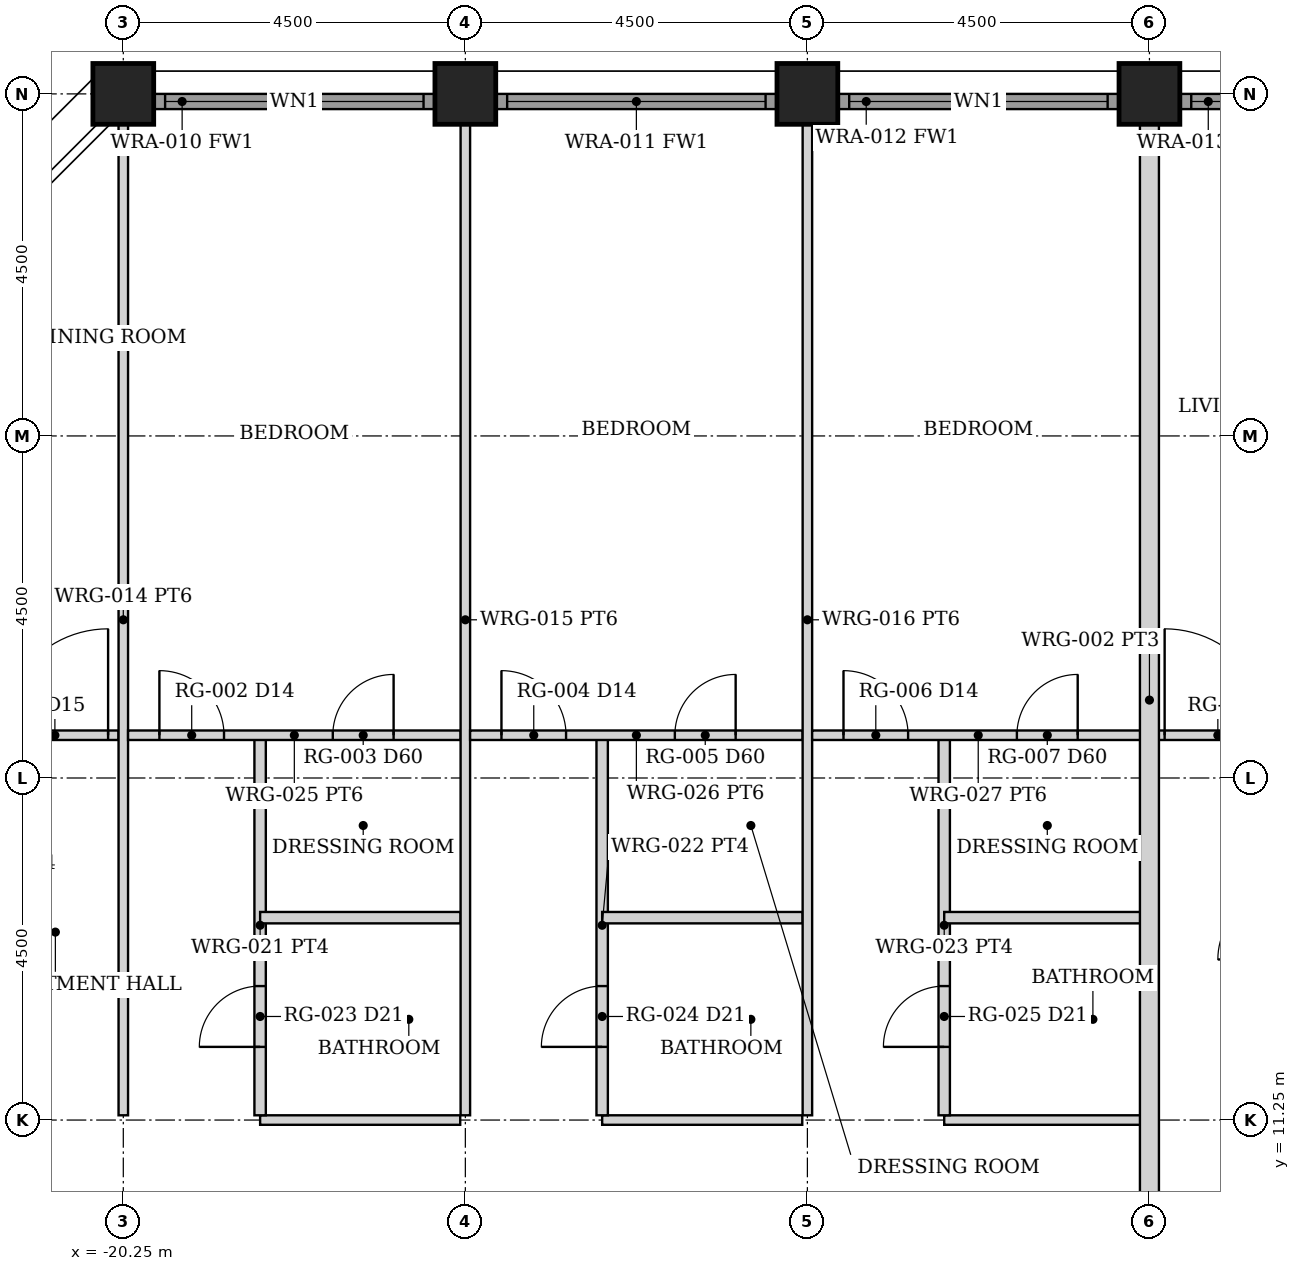
"""IFC4 building model, lengths in metres.
Left out: names, types, materials, properties, quantities, classifications, styles, units other than length and angle.
Written with IfcOpenShell. Run it as: python <this file> out.ifc"""

import sys

from ifc_helpers import new_model, si_unit, direction, frame, frame_2d, origin, origin_2d, place, context, subcontext, project, spatial, rectangle, hollow_rectangle, extrude, element, fill, save


model = new_model("IFC4")
c1 = context("Model", 3, precision=1e-05, world=origin(), true_north=direction((0.0, 1.0)))
c2 = subcontext(c1, "Body", "Model", "MODEL_VIEW")
j1 = project(units=[si_unit("LENGTHUNIT", "METRE"), si_unit("PLANEANGLEUNIT", "RADIAN")], contexts=[c1])
p1 = place(None, origin())
s1 = spatial("IfcSite", under=j1, at=p1, CompositionType="ELEMENT")
p2 = place(p1, origin())
s2 = spatial("IfcBuilding", under=s1, at=p2, CompositionType="ELEMENT")
p3 = place(p2, frame((0.0, 0.0, 89.5)))
s3 = spatial("IfcBuildingStorey", under=s2, at=p3, CompositionType="ELEMENT", Elevation=89.5)
for number, where, z_axis, x_axis in (
    (1, (-20.25, 24.75, 0.0), (0.0, 0.0, 1.0), (0.0, 1.0, 0.0)),
    (2, (-15.75, 24.75, 0.0), (0.0, 0.0, 1.0), (0.0, 1.0, 0.0)),
    (3, (-11.25, 24.75, 0.0), (0.0, 0.0, 1.0), (0.0, 1.0, 0.0)),
    (4, (-6.75, 24.75, 0.0), (0.0, 0.0, 1.0), (0.0, 1.0, 0.0)),
):
    element("IfcColumn", number, at=place(p3, frame(where, z_axis=z_axis, x_axis=x_axis)), inside=s3, PredefinedType="COLUMN", context=c2, shape_type="SweptSolid", body=[
        extrude(hollow_rectangle(XDim=0.8, YDim=0.8, WallThickness=0.06, at=origin_2d()), origin(), (0.0, 0.0, 1.0), 3.5),
    ])
p4 = place(p3, frame((-19.845, 24.65, 0.0), z_axis=(0.0, 0.0, 1.0), x_axis=(1.0, 0.0, 0.0)))
e5 = element("IfcWall", 5, at=p4, inside=s3, PredefinedType="SOLIDWALL", context=c2, shape_type="SweptSolid", body=[
    extrude(rectangle(XDim=3.69, YDim=0.2, at=frame_2d((1.845, 0.0))), origin(), (0.0, 0.0, 1.0), 2.379),
])
p5 = place(p4, frame((0.145, 0.0, 0.3)))
e6 = element("IfcOpeningElement", 6, at=p5, cuts=e5, PredefinedType="OPENING", context=c2, shape_type="SweptSolid", body=[
    extrude(rectangle(XDim=3.4, YDim=1.929, at=frame_2d((1.7, 0.964))), frame((0.0, 0.11, 0.0), z_axis=(0.0, -1.0, 0.0), x_axis=(1.0, 0.0, 0.0)), (0.0, 0.0, 1.0), 0.22),
])
p6 = place(p3, frame((-15.345, 24.65, 0.0), z_axis=(0.0, 0.0, 1.0), x_axis=(1.0, 0.0, 0.0)))
e7 = element("IfcWall", 7, at=p6, inside=s3, PredefinedType="SOLIDWALL", context=c2, shape_type="SweptSolid", body=[
    extrude(rectangle(XDim=3.69, YDim=0.2, at=frame_2d((1.845, 0.0))), origin(), (0.0, 0.0, 1.0), 2.379),
])
p7 = place(p6, frame((0.145, 0.0, 0.3)))
e8 = element("IfcOpeningElement", 8, at=p7, cuts=e7, PredefinedType="OPENING", context=c2, shape_type="SweptSolid", body=[
    extrude(rectangle(XDim=3.4, YDim=1.929, at=frame_2d((1.7, 0.964))), frame((0.0, 0.11, 0.0), z_axis=(0.0, -1.0, 0.0), x_axis=(1.0, 0.0, 0.0)), (0.0, 0.0, 1.0), 0.22),
])
p8 = place(p3, frame((-10.845, 24.65, 0.0), z_axis=(0.0, 0.0, 1.0), x_axis=(1.0, 0.0, 0.0)))
e9 = element("IfcWall", 9, at=p8, inside=s3, PredefinedType="SOLIDWALL", context=c2, shape_type="SweptSolid", body=[
    extrude(rectangle(XDim=3.69, YDim=0.2, at=frame_2d((1.845, 0.0))), origin(), (0.0, 0.0, 1.0), 2.379),
])
p9 = place(p8, frame((0.145, 0.0, 0.3)))
e10 = element("IfcOpeningElement", 10, at=p9, cuts=e9, PredefinedType="OPENING", context=c2, shape_type="SweptSolid", body=[
    extrude(rectangle(XDim=3.4, YDim=1.929, at=frame_2d((1.7, 0.964))), frame((0.0, 0.11, 0.0), z_axis=(0.0, -1.0, 0.0), x_axis=(1.0, 0.0, 0.0)), (0.0, 0.0, 1.0), 0.22),
])
p10 = place(p3, frame((-6.345, 24.65, 0.0), z_axis=(0.0, 0.0, 1.0), x_axis=(1.0, 0.0, 0.0)))
e11 = element("IfcWall", 11, at=p10, inside=s3, PredefinedType="SOLIDWALL", context=c2, shape_type="SweptSolid", body=[
    extrude(rectangle(XDim=3.69, YDim=0.2, at=frame_2d((1.845, 0.0))), origin(), (0.0, 0.0, 1.0), 2.379),
])
p11 = place(p10, frame((0.145, 0.0, 0.3)))
e12 = element("IfcOpeningElement", 12, at=p11, cuts=e11, PredefinedType="OPENING", context=c2, shape_type="SweptSolid", body=[
    extrude(rectangle(XDim=3.4, YDim=1.929, at=frame_2d((1.7, 0.964))), frame((0.0, 0.11, 0.0), z_axis=(0.0, -1.0, 0.0), x_axis=(1.0, 0.0, 0.0)), (0.0, 0.0, 1.0), 0.22),
])
p12 = place(p3, frame((-24.55, 16.312, 0.0), z_axis=(0.0, 0.0, 1.0), x_axis=(1.0, 0.0, 0.0)))
e13 = element("IfcWall", 13, at=p12, inside=s3, PredefinedType="PARTITIONING", context=c2, shape_type="SweptSolid", body=[
    extrude(rectangle(XDim=4.238, YDim=0.125, at=frame_2d((2.119, 0.0))), origin(), (0.0, 0.0, 1.0), 2.373),
])
p13 = place(p12, frame((2.7, 0.0, 0.0)))
e14 = element("IfcOpeningElement", 14, at=p13, cuts=e13, PredefinedType="OPENING", context=c2, shape_type="SweptSolid", body=[
    extrude(rectangle(XDim=1.4, YDim=2.1, at=frame_2d((0.7, 1.05))), frame((0.0, 0.073, 0.0), z_axis=(0.0, -1.0, 0.0), x_axis=(1.0, 0.0, 0.0)), (0.0, 0.0, 1.0), 0.145),
])
p14 = place(p3, frame((-20.25, 11.312, 0.0), z_axis=(0.0, 0.0, 1.0), x_axis=(0.0, 1.0, 0.0)))
e15 = element("IfcWall", 15, at=p14, inside=s3, PredefinedType="PARTITIONING", context=c2, shape_type="SweptSolid", body=[
    extrude(rectangle(XDim=13.038, YDim=0.125, at=frame_2d((6.519, 0.0))), origin(), (0.0, 0.0, 1.0), 2.373),
])
p15 = place(p3, frame((-18.45, 11.25, 0.0), z_axis=(0.0, 0.0, 1.0), x_axis=(1.0, 0.0, 0.0)))
e16 = element("IfcWall", 16, at=p15, inside=s3, PredefinedType="PARTITIONING", context=c2, shape_type="SweptSolid", body=[
    extrude(rectangle(XDim=2.633, YDim=0.125, at=frame_2d((1.316, 0.0))), origin(), (0.0, 0.0, 1.0), 2.373),
])
p16 = place(p3, frame((-18.45, 11.312, 0.0), z_axis=(0.0, 0.0, 1.0), x_axis=(0.0, 1.0, 0.0)))
e17 = element("IfcWall", 17, at=p16, inside=s3, PredefinedType="PARTITIONING", context=c2, shape_type="SweptSolid", body=[
    extrude(rectangle(XDim=5.0, YDim=0.15, at=frame_2d((2.5, 0.0))), origin(), (0.0, 0.0, 1.0), 2.373),
])
p17 = place(p16, frame((0.9, 0.0, 0.0)))
e18 = element("IfcOpeningElement", 18, at=p17, cuts=e17, PredefinedType="OPENING", context=c2, shape_type="SweptSolid", body=[
    extrude(rectangle(XDim=0.8, YDim=2.1, at=frame_2d((0.4, 1.05))), frame((0.0, 0.085, 0.0), z_axis=(0.0, -1.0, 0.0), x_axis=(1.0, 0.0, 0.0)), (0.0, 0.0, 1.0), 0.17),
])
p18 = place(p3, frame((-20.188, 16.312, 0.0), z_axis=(0.0, 0.0, 1.0), x_axis=(1.0, 0.0, 0.0)))
e19 = element("IfcWall", 19, at=p18, inside=s3, PredefinedType="PARTITIONING", context=c2, shape_type="SweptSolid", body=[
    extrude(rectangle(XDim=4.375, YDim=0.125, at=frame_2d((2.188, 0.0))), origin(), (0.0, 0.0, 1.0), 2.373),
])
p19 = place(p18, frame((0.413, 0.0, 0.0)))
e20 = element("IfcOpeningElement", 20, at=p19, cuts=e19, PredefinedType="OPENING", context=c2, shape_type="SweptSolid", body=[
    extrude(rectangle(XDim=0.85, YDim=2.1, at=frame_2d((0.425, 1.05))), frame((0.0, 0.073, 0.0), z_axis=(0.0, -1.0, 0.0), x_axis=(1.0, 0.0, 0.0)), (0.0, 0.0, 1.0), 0.145),
])
p20 = place(p18, frame((2.694, 0.0, 0.0)))
e21 = element("IfcOpeningElement", 21, at=p20, cuts=e19, PredefinedType="OPENING", context=c2, shape_type="SweptSolid", body=[
    extrude(rectangle(XDim=0.8, YDim=2.1, at=frame_2d((0.4, 1.05))), frame((0.0, 0.073, 0.0), z_axis=(0.0, -1.0, 0.0), x_axis=(1.0, 0.0, 0.0)), (0.0, 0.0, 1.0), 0.145),
])
p21 = place(p3, frame((-18.45, 13.913, 0.0), z_axis=(0.0, 0.0, 1.0), x_axis=(1.0, 0.0, 0.0)))
e22 = element("IfcWall", 22, at=p21, inside=s3, PredefinedType="PARTITIONING", context=c2, shape_type="SweptSolid", body=[
    extrude(rectangle(XDim=2.637, YDim=0.15, at=frame_2d((1.319, 0.0))), origin(), (0.0, 0.0, 1.0), 2.373),
])
p22 = place(p3, frame((-15.75, 11.312, 0.0), z_axis=(0.0, 0.0, 1.0), x_axis=(0.0, 1.0, 0.0)))
e23 = element("IfcWall", 23, at=p22, inside=s3, PredefinedType="PARTITIONING", context=c2, shape_type="SweptSolid", body=[
    extrude(rectangle(XDim=13.038, YDim=0.125, at=frame_2d((6.519, 0.0))), origin(), (0.0, 0.0, 1.0), 2.373),
])
p23 = place(p3, frame((-13.95, 11.25, 0.0), z_axis=(0.0, 0.0, 1.0), x_axis=(1.0, 0.0, 0.0)))
e24 = element("IfcWall", 24, at=p23, inside=s3, PredefinedType="PARTITIONING", context=c2, shape_type="SweptSolid", body=[
    extrude(rectangle(XDim=2.633, YDim=0.125, at=frame_2d((1.316, 0.0))), origin(), (0.0, 0.0, 1.0), 2.373),
])
p24 = place(p3, frame((-13.95, 11.312, 0.0), z_axis=(0.0, 0.0, 1.0), x_axis=(0.0, 1.0, 0.0)))
e25 = element("IfcWall", 25, at=p24, inside=s3, PredefinedType="PARTITIONING", context=c2, shape_type="SweptSolid", body=[
    extrude(rectangle(XDim=5.0, YDim=0.15, at=frame_2d((2.5, 0.0))), origin(), (0.0, 0.0, 1.0), 2.373),
])
p25 = place(p24, frame((0.9, 0.0, 0.0)))
e26 = element("IfcOpeningElement", 26, at=p25, cuts=e25, PredefinedType="OPENING", context=c2, shape_type="SweptSolid", body=[
    extrude(rectangle(XDim=0.8, YDim=2.1, at=frame_2d((0.4, 1.05))), frame((0.0, 0.085, 0.0), z_axis=(0.0, -1.0, 0.0), x_axis=(1.0, 0.0, 0.0)), (0.0, 0.0, 1.0), 0.17),
])
p26 = place(p3, frame((-15.688, 16.312, 0.0), z_axis=(0.0, 0.0, 1.0), x_axis=(1.0, 0.0, 0.0)))
e27 = element("IfcWall", 27, at=p26, inside=s3, PredefinedType="PARTITIONING", context=c2, shape_type="SweptSolid", body=[
    extrude(rectangle(XDim=4.375, YDim=0.125, at=frame_2d((2.188, 0.0))), origin(), (0.0, 0.0, 1.0), 2.373),
])
p27 = place(p26, frame((0.413, 0.0, 0.0)))
e28 = element("IfcOpeningElement", 28, at=p27, cuts=e27, PredefinedType="OPENING", context=c2, shape_type="SweptSolid", body=[
    extrude(rectangle(XDim=0.85, YDim=2.1, at=frame_2d((0.425, 1.05))), frame((0.0, 0.073, 0.0), z_axis=(0.0, -1.0, 0.0), x_axis=(1.0, 0.0, 0.0)), (0.0, 0.0, 1.0), 0.145),
])
p28 = place(p26, frame((2.694, 0.0, 0.0)))
e29 = element("IfcOpeningElement", 29, at=p28, cuts=e27, PredefinedType="OPENING", context=c2, shape_type="SweptSolid", body=[
    extrude(rectangle(XDim=0.8, YDim=2.1, at=frame_2d((0.4, 1.05))), frame((0.0, 0.073, 0.0), z_axis=(0.0, -1.0, 0.0), x_axis=(1.0, 0.0, 0.0)), (0.0, 0.0, 1.0), 0.145),
])
p29 = place(p3, frame((-13.95, 13.913, 0.0), z_axis=(0.0, 0.0, 1.0), x_axis=(1.0, 0.0, 0.0)))
e30 = element("IfcWall", 30, at=p29, inside=s3, PredefinedType="PARTITIONING", context=c2, shape_type="SweptSolid", body=[
    extrude(rectangle(XDim=2.637, YDim=0.15, at=frame_2d((1.319, 0.0))), origin(), (0.0, 0.0, 1.0), 2.373),
])
p30 = place(p3, frame((-11.25, 11.312, 0.0), z_axis=(0.0, 0.0, 1.0), x_axis=(0.0, 1.0, 0.0)))
e31 = element("IfcWall", 31, at=p30, inside=s3, PredefinedType="PARTITIONING", context=c2, shape_type="SweptSolid", body=[
    extrude(rectangle(XDim=13.038, YDim=0.125, at=frame_2d((6.519, 0.0))), origin(), (0.0, 0.0, 1.0), 2.373),
])
p31 = place(p3, frame((-9.45, 11.25, 0.0), z_axis=(0.0, 0.0, 1.0), x_axis=(1.0, 0.0, 0.0)))
e32 = element("IfcWall", 32, at=p31, inside=s3, PredefinedType="PARTITIONING", context=c2, shape_type="SweptSolid", body=[
    extrude(rectangle(XDim=2.633, YDim=0.125, at=frame_2d((1.316, 0.0))), origin(), (0.0, 0.0, 1.0), 2.373),
])
p32 = place(p3, frame((-9.45, 11.312, 0.0), z_axis=(0.0, 0.0, 1.0), x_axis=(0.0, 1.0, 0.0)))
e33 = element("IfcWall", 33, at=p32, inside=s3, PredefinedType="PARTITIONING", context=c2, shape_type="SweptSolid", body=[
    extrude(rectangle(XDim=5.0, YDim=0.15, at=frame_2d((2.5, 0.0))), origin(), (0.0, 0.0, 1.0), 2.373),
])
p33 = place(p32, frame((0.9, 0.0, 0.0)))
e34 = element("IfcOpeningElement", 34, at=p33, cuts=e33, PredefinedType="OPENING", context=c2, shape_type="SweptSolid", body=[
    extrude(rectangle(XDim=0.8, YDim=2.1, at=frame_2d((0.4, 1.05))), frame((0.0, 0.085, 0.0), z_axis=(0.0, -1.0, 0.0), x_axis=(1.0, 0.0, 0.0)), (0.0, 0.0, 1.0), 0.17),
])
p34 = place(p3, frame((-11.188, 16.312, 0.0), z_axis=(0.0, 0.0, 1.0), x_axis=(1.0, 0.0, 0.0)))
e35 = element("IfcWall", 35, at=p34, inside=s3, PredefinedType="PARTITIONING", context=c2, shape_type="SweptSolid", body=[
    extrude(rectangle(XDim=4.37, YDim=0.125, at=frame_2d((2.185, 0.0))), origin(), (0.0, 0.0, 1.0), 2.373),
])
p35 = place(p34, frame((0.413, 0.0, 0.0)))
e36 = element("IfcOpeningElement", 36, at=p35, cuts=e35, PredefinedType="OPENING", context=c2, shape_type="SweptSolid", body=[
    extrude(rectangle(XDim=0.85, YDim=2.1, at=frame_2d((0.425, 1.05))), frame((0.0, 0.073, 0.0), z_axis=(0.0, -1.0, 0.0), x_axis=(1.0, 0.0, 0.0)), (0.0, 0.0, 1.0), 0.145),
])
p36 = place(p34, frame((2.694, 0.0, 0.0)))
e37 = element("IfcOpeningElement", 37, at=p36, cuts=e35, PredefinedType="OPENING", context=c2, shape_type="SweptSolid", body=[
    extrude(rectangle(XDim=0.8, YDim=2.1, at=frame_2d((0.4, 1.05))), frame((0.0, 0.073, 0.0), z_axis=(0.0, -1.0, 0.0), x_axis=(1.0, 0.0, 0.0)), (0.0, 0.0, 1.0), 0.145),
])
p37 = place(p3, frame((-9.45, 13.913, 0.0), z_axis=(0.0, 0.0, 1.0), x_axis=(1.0, 0.0, 0.0)))
e38 = element("IfcWall", 38, at=p37, inside=s3, PredefinedType="PARTITIONING", context=c2, shape_type="SweptSolid", body=[
    extrude(rectangle(XDim=2.633, YDim=0.15, at=frame_2d((1.316, 0.0))), origin(), (0.0, 0.0, 1.0), 2.373),
])
p38 = place(p3, frame((-6.683, 16.312, 0.0), z_axis=(0.0, 0.0, 1.0), x_axis=(1.0, 0.0, 0.0)))
e39 = element("IfcWall", 39, at=p38, inside=s3, PredefinedType="PARTITIONING", context=c2, shape_type="SweptSolid", body=[
    extrude(rectangle(XDim=4.37, YDim=0.125, at=frame_2d((2.185, 0.0))), origin(), (0.0, 0.0, 1.0), 2.373),
])
p39 = place(p38, frame((0.133, 0.0, 0.0)))
e40 = element("IfcOpeningElement", 40, at=p39, cuts=e39, PredefinedType="OPENING", context=c2, shape_type="SweptSolid", body=[
    extrude(rectangle(XDim=1.4, YDim=2.1, at=frame_2d((0.7, 1.05))), frame((0.0, 0.073, 0.0), z_axis=(0.0, -1.0, 0.0), x_axis=(1.0, 0.0, 0.0)), (0.0, 0.0, 1.0), 0.145),
])
p40 = place(p3, frame((-6.75, 9.2, 0.0), z_axis=(0.0, 0.0, 1.0), x_axis=(0.0, 1.0, 0.0)))
e41 = element("IfcWall", 41, at=p40, inside=s3, PredefinedType="PARTITIONING", context=c2, shape_type="SweptSolid", body=[
    extrude(rectangle(XDim=15.15, YDim=0.25, at=frame_2d((7.575, 0.0))), origin(), (0.0, 0.0, 1.0), 2.373),
])
p41 = place(p5, origin())
e42 = element("IfcWindow", 42, at=p41, inside=s3, PartitioningType="SINGLE_PANEL", PredefinedType="WINDOW", context=c2, shape_type="SweptSolid", body=[
    extrude(rectangle(XDim=3.4, YDim=1.929, at=frame_2d((1.7, 0.964))), frame((0.0, 0.03, 0.0), z_axis=(0.0, -1.0, 0.0), x_axis=(1.0, 0.0, 0.0)), (0.0, 0.0, 1.0), 0.06),
])
fill(e6, e42)
p42 = place(p7, origin())
e43 = element("IfcWindow", 43, at=p42, inside=s3, PartitioningType="SINGLE_PANEL", PredefinedType="WINDOW", context=c2, shape_type="SweptSolid", body=[
    extrude(rectangle(XDim=3.4, YDim=1.929, at=frame_2d((1.7, 0.964))), frame((0.0, 0.03, 0.0), z_axis=(0.0, -1.0, 0.0), x_axis=(1.0, 0.0, 0.0)), (0.0, 0.0, 1.0), 0.06),
])
fill(e8, e43)
p43 = place(p9, origin())
e44 = element("IfcWindow", 44, at=p43, inside=s3, PartitioningType="SINGLE_PANEL", PredefinedType="WINDOW", context=c2, shape_type="SweptSolid", body=[
    extrude(rectangle(XDim=3.4, YDim=1.929, at=frame_2d((1.7, 0.964))), frame((0.0, 0.03, 0.0), z_axis=(0.0, -1.0, 0.0), x_axis=(1.0, 0.0, 0.0)), (0.0, 0.0, 1.0), 0.06),
])
fill(e10, e44)
p44 = place(p11, origin())
e45 = element("IfcWindow", 45, at=p44, inside=s3, PartitioningType="SINGLE_PANEL", PredefinedType="WINDOW", context=c2, shape_type="SweptSolid", body=[
    extrude(rectangle(XDim=3.4, YDim=1.929, at=frame_2d((1.7, 0.964))), frame((0.0, 0.03, 0.0), z_axis=(0.0, -1.0, 0.0), x_axis=(1.0, 0.0, 0.0)), (0.0, 0.0, 1.0), 0.06),
])
fill(e12, e45)
p45 = place(p13, origin())
e46 = element("IfcDoor", 46, at=p45, inside=s3, OperationType="SINGLE_SWING_RIGHT", PredefinedType="DOOR", context=c2, shape_type="SweptSolid", body=[
    extrude(rectangle(XDim=1.4, YDim=2.1, at=frame_2d((0.7, 1.05))), frame((0.0, 0.025, 0.0), z_axis=(0.0, -1.0, 0.0), x_axis=(1.0, 0.0, 0.0)), (0.0, 0.0, 1.0), 0.05),
])
fill(e14, e46)
p46 = place(p19, origin())
e47 = element("IfcDoor", 47, at=p46, inside=s3, OperationType="SINGLE_SWING_LEFT", PredefinedType="DOOR", context=c2, shape_type="SweptSolid", body=[
    extrude(rectangle(XDim=0.85, YDim=2.1, at=frame_2d((0.425, 1.05))), frame((0.0, 0.025, 0.0), z_axis=(0.0, -1.0, 0.0), x_axis=(1.0, 0.0, 0.0)), (0.0, 0.0, 1.0), 0.05),
])
fill(e20, e47)
p47 = place(p17, origin())
e48 = element("IfcDoor", 48, at=p47, inside=s3, OperationType="SINGLE_SWING_LEFT", PredefinedType="DOOR", context=c2, shape_type="SweptSolid", body=[
    extrude(rectangle(XDim=0.8, YDim=2.1, at=frame_2d((0.4, 1.05))), frame((0.0, 0.025, 0.0), z_axis=(0.0, -1.0, 0.0), x_axis=(1.0, 0.0, 0.0)), (0.0, 0.0, 1.0), 0.05),
])
fill(e18, e48)
p48 = place(p20, origin())
e49 = element("IfcDoor", 49, at=p48, inside=s3, OperationType="SINGLE_SWING_RIGHT", PredefinedType="DOOR", context=c2, shape_type="SweptSolid", body=[
    extrude(rectangle(XDim=0.8, YDim=2.1, at=frame_2d((0.4, 1.05))), frame((0.0, 0.025, 0.0), z_axis=(0.0, -1.0, 0.0), x_axis=(1.0, 0.0, 0.0)), (0.0, 0.0, 1.0), 0.05),
])
fill(e21, e49)
p49 = place(p27, origin())
e50 = element("IfcDoor", 50, at=p49, inside=s3, OperationType="SINGLE_SWING_LEFT", PredefinedType="DOOR", context=c2, shape_type="SweptSolid", body=[
    extrude(rectangle(XDim=0.85, YDim=2.1, at=frame_2d((0.425, 1.05))), frame((0.0, 0.025, 0.0), z_axis=(0.0, -1.0, 0.0), x_axis=(1.0, 0.0, 0.0)), (0.0, 0.0, 1.0), 0.05),
])
fill(e28, e50)
p50 = place(p25, origin())
e51 = element("IfcDoor", 51, at=p50, inside=s3, OperationType="SINGLE_SWING_LEFT", PredefinedType="DOOR", context=c2, shape_type="SweptSolid", body=[
    extrude(rectangle(XDim=0.8, YDim=2.1, at=frame_2d((0.4, 1.05))), frame((0.0, 0.025, 0.0), z_axis=(0.0, -1.0, 0.0), x_axis=(1.0, 0.0, 0.0)), (0.0, 0.0, 1.0), 0.05),
])
fill(e26, e51)
p51 = place(p28, origin())
e52 = element("IfcDoor", 52, at=p51, inside=s3, OperationType="SINGLE_SWING_RIGHT", PredefinedType="DOOR", context=c2, shape_type="SweptSolid", body=[
    extrude(rectangle(XDim=0.8, YDim=2.1, at=frame_2d((0.4, 1.05))), frame((0.0, 0.025, 0.0), z_axis=(0.0, -1.0, 0.0), x_axis=(1.0, 0.0, 0.0)), (0.0, 0.0, 1.0), 0.05),
])
fill(e29, e52)
p52 = place(p35, origin())
e53 = element("IfcDoor", 53, at=p52, inside=s3, OperationType="SINGLE_SWING_LEFT", PredefinedType="DOOR", context=c2, shape_type="SweptSolid", body=[
    extrude(rectangle(XDim=0.85, YDim=2.1, at=frame_2d((0.425, 1.05))), frame((0.0, 0.025, 0.0), z_axis=(0.0, -1.0, 0.0), x_axis=(1.0, 0.0, 0.0)), (0.0, 0.0, 1.0), 0.05),
])
fill(e36, e53)
p53 = place(p33, origin())
e54 = element("IfcDoor", 54, at=p53, inside=s3, OperationType="SINGLE_SWING_LEFT", PredefinedType="DOOR", context=c2, shape_type="SweptSolid", body=[
    extrude(rectangle(XDim=0.8, YDim=2.1, at=frame_2d((0.4, 1.05))), frame((0.0, 0.025, 0.0), z_axis=(0.0, -1.0, 0.0), x_axis=(1.0, 0.0, 0.0)), (0.0, 0.0, 1.0), 0.05),
])
fill(e34, e54)
p54 = place(p36, origin())
e55 = element("IfcDoor", 55, at=p54, inside=s3, OperationType="SINGLE_SWING_RIGHT", PredefinedType="DOOR", context=c2, shape_type="SweptSolid", body=[
    extrude(rectangle(XDim=0.8, YDim=2.1, at=frame_2d((0.4, 1.05))), frame((0.0, 0.025, 0.0), z_axis=(0.0, -1.0, 0.0), x_axis=(1.0, 0.0, 0.0)), (0.0, 0.0, 1.0), 0.05),
])
fill(e37, e55)
p55 = place(p39, origin())
e56 = element("IfcDoor", 56, at=p55, inside=s3, OperationType="SINGLE_SWING_LEFT", PredefinedType="DOOR", context=c2, shape_type="SweptSolid", body=[
    extrude(rectangle(XDim=1.4, YDim=2.1, at=frame_2d((0.7, 1.05))), frame((0.0, 0.025, 0.0), z_axis=(0.0, -1.0, 0.0), x_axis=(1.0, 0.0, 0.0)), (0.0, 0.0, 1.0), 0.05),
])
fill(e40, e56)
save(model, sys.argv[1])
